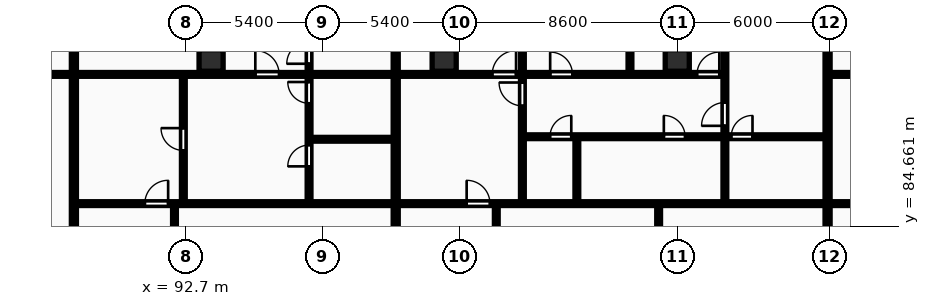
"""IFC4 building model, lengths in metres.
Left out: names, types, materials, properties, quantities, classifications, styles, units other than length and angle.
Written with IfcOpenShell. Run it as: python <this file> out.ifc"""

import sys

from ifc_helpers import new_model, si_unit, direction, frame, frame_2d, origin, origin_2d, place, context, subcontext, project, spatial, rectangle, extrude, element, fill, save


model = new_model("IFC4")
c1 = context("Model", 3, precision=1e-05, world=origin(), true_north=direction((0.0, 1.0)))
c2 = subcontext(c1, "Body", "Model", "MODEL_VIEW")
j1 = project(units=[si_unit("LENGTHUNIT", "METRE"), si_unit("PLANEANGLEUNIT", "RADIAN")], contexts=[c1])
p1 = place(None, origin())
s1 = spatial("IfcSite", under=j1, at=p1, CompositionType="ELEMENT")
p2 = place(p1, origin())
s2 = spatial("IfcBuilding", under=s1, at=p2, CompositionType="ELEMENT")
p3 = place(p2, frame((0.0, 0.0, 87.3)))
s3 = spatial("IfcBuildingStorey", under=s2, at=p3, CompositionType="ELEMENT", Elevation=87.3)
for number, where, z_axis, x_axis in (
    (1, (93.7, 91.2, 0.0), (0.0, 0.0, 1.0), (1.0, 0.0, 0.0)),
    (2, (102.9, 91.2, 0.0), (0.0, 0.0, 1.0), (1.0, 0.0, 0.0)),
    (3, (112.1, 91.2, 0.0), (0.0, 0.0, 1.0), (1.0, 0.0, 0.0)),
):
    element("IfcColumn", number, at=place(p3, frame(where, z_axis=z_axis, x_axis=x_axis)), inside=s3, PredefinedType="COLUMN", context=c2, shape_type="SweptSolid", body=[
        extrude(rectangle(XDim=0.95, YDim=0.85, at=origin_2d()), origin(), (0.0, 0.0, 1.0), 3.25),
    ])
p4 = place(p3, frame((88.285, 69.43, 0.0), z_axis=(0.0, 0.0, 1.0), x_axis=(0.0, 1.0, 0.0)))
e4 = element("IfcWall", 4, at=p4, inside=s3, PredefinedType="PARTITIONING", context=c2, shape_type="SweptSolid", body=[
    extrude(rectangle(XDim=26.47, YDim=0.2, at=frame_2d((13.235, 0.0))), origin(), (0.0, 0.0, 1.0), 2.97),
])
p5 = place(p3, frame((69.447, 90.65, 0.0), z_axis=(0.0, 0.0, 1.0), x_axis=(1.0, 0.0, 0.0)))
e5 = element("IfcWall", 5, at=p5, inside=s3, PredefinedType="PARTITIONING", context=c2, shape_type="SweptSolid", body=[
    extrude(rectangle(XDim=18.758, YDim=0.15, at=frame_2d((9.379, 0.0))), origin(), (0.0, 0.0, 1.0), 2.97),
])
p6 = place(p5, frame((3.965, 0.0, 0.0)))
e6 = element("IfcOpeningElement", 6, at=p6, cuts=e5, PredefinedType="OPENING", context=c2, shape_type="SweptSolid", body=[
    extrude(rectangle(XDim=0.94, YDim=2.1, at=frame_2d((0.47, 1.05))), frame((0.0, 0.085, 0.0), z_axis=(0.0, -1.0, 0.0), x_axis=(1.0, 0.0, 0.0)), (0.0, 0.0, 1.0), 0.17),
])
p7 = place(p5, frame((8.909, 0.0, 0.0)))
e7 = element("IfcOpeningElement", 7, at=p7, cuts=e5, PredefinedType="OPENING", context=c2, shape_type="SweptSolid", body=[
    extrude(rectangle(XDim=0.94, YDim=2.1, at=frame_2d((0.47, 1.05))), frame((0.0, 0.085, 0.0), z_axis=(0.0, -1.0, 0.0), x_axis=(1.0, 0.0, 0.0)), (0.0, 0.0, 1.0), 0.17),
])
p8 = place(p3, frame((100.987, 69.43, 0.0), z_axis=(0.0, 0.0, 1.0), x_axis=(0.0, 1.0, 0.0)))
e8 = element("IfcWall", 8, at=p8, inside=s3, PredefinedType="PARTITIONING", context=c2, shape_type="SweptSolid", body=[
    extrude(rectangle(XDim=26.47, YDim=0.2, at=frame_2d((13.235, 0.0))), origin(), (0.0, 0.0, 1.0), 2.97),
])
p9 = place(p3, frame((92.255, 69.41, 0.0), z_axis=(0.0, 0.0, 1.0), x_axis=(0.0, 1.0, 0.0)))
e9 = element("IfcWall", 9, at=p9, inside=s3, PredefinedType="PARTITIONING", context=c2, shape_type="SweptSolid", body=[
    extrude(rectangle(XDim=16.1, YDim=0.15, at=frame_2d((8.05, 0.0))), origin(), (0.0, 0.0, 1.0), 2.97),
])
p10 = place(p9, frame((6.74, 0.0, 0.0)))
e10 = element("IfcOpeningElement", 10, at=p10, cuts=e9, PredefinedType="OPENING", context=c2, shape_type="SweptSolid", body=[
    extrude(rectangle(XDim=0.88, YDim=2.06, at=frame_2d((0.44, 1.03))), frame((0.0, 0.085, 0.0), z_axis=(0.0, -1.0, 0.0), x_axis=(1.0, 0.0, 0.0)), (0.0, 0.0, 1.0), 0.17),
])
p11 = place(p3, frame((92.604, 85.59, 0.0), z_axis=(0.0, 0.0, 1.0), x_axis=(0.0, 1.0, 0.0)))
e11 = element("IfcWall", 11, at=p11, inside=s3, PredefinedType="PARTITIONING", context=c2, shape_type="SweptSolid", body=[
    extrude(rectangle(XDim=5.0, YDim=0.15, at=frame_2d((2.5, 0.0))), origin(), (0.0, 0.0, 1.0), 2.97),
])
p12 = place(p11, frame((2.06, 0.0, 0.0)))
e12 = element("IfcOpeningElement", 12, at=p12, cuts=e11, PredefinedType="OPENING", context=c2, shape_type="SweptSolid", body=[
    extrude(rectangle(XDim=0.88, YDim=2.06, at=frame_2d((0.44, 1.03))), frame((0.0, 0.085, 0.0), z_axis=(0.0, -1.0, 0.0), x_axis=(1.0, 0.0, 0.0)), (0.0, 0.0, 1.0), 0.17),
])
p13 = place(p3, frame((97.627, 88.09, 0.0), z_axis=(0.0, 0.0, 1.0), x_axis=(1.0, 0.0, 0.0)))
e13 = element("IfcWall", 13, at=p13, inside=s3, PredefinedType="PARTITIONING", context=c2, shape_type="SweptSolid", body=[
    extrude(rectangle(XDim=3.28, YDim=0.15, at=frame_2d((1.64, 0.0))), origin(), (0.0, 0.0, 1.0), 2.97),
])
p14 = place(p3, frame((97.567, 85.59, 0.0), z_axis=(0.0, 0.0, 1.0), x_axis=(0.0, 1.0, 0.0)))
e14 = element("IfcWall", 14, at=p14, inside=s3, PredefinedType="PARTITIONING", context=c2, shape_type="SweptSolid", body=[
    extrude(rectangle(XDim=10.31, YDim=0.15, at=frame_2d((5.155, 0.0))), origin(), (0.0, 0.0, 1.0), 2.97),
])
p15 = place(p14, frame((1.43, 0.0, 0.0)))
e15 = element("IfcOpeningElement", 15, at=p15, cuts=e14, PredefinedType="OPENING", context=c2, shape_type="SweptSolid", body=[
    extrude(rectangle(XDim=0.84, YDim=2.04, at=frame_2d((0.42, 1.02))), frame((0.0, 0.085, 0.0), z_axis=(0.0, -1.0, 0.0), x_axis=(1.0, 0.0, 0.0)), (0.0, 0.0, 1.0), 0.17),
])
p16 = place(p14, frame((3.92, 0.0, 0.0)))
e16 = element("IfcOpeningElement", 16, at=p16, cuts=e14, PredefinedType="OPENING", context=c2, shape_type="SweptSolid", body=[
    extrude(rectangle(XDim=0.84, YDim=2.04, at=frame_2d((0.42, 1.02))), frame((0.0, 0.085, 0.0), z_axis=(0.0, -1.0, 0.0), x_axis=(1.0, 0.0, 0.0)), (0.0, 0.0, 1.0), 0.17),
])
p17 = place(p14, frame((5.48, 0.0, 0.0)))
e17 = element("IfcOpeningElement", 17, at=p17, cuts=e14, PredefinedType="OPENING", context=c2, shape_type="SweptSolid", body=[
    extrude(rectangle(XDim=0.88, YDim=2.06, at=frame_2d((0.44, 1.03))), frame((0.0, 0.085, 0.0), z_axis=(0.0, -1.0, 0.0), x_axis=(1.0, 0.0, 0.0)), (0.0, 0.0, 1.0), 0.17),
])
p18 = place(p3, frame((88.365, 85.55, 0.0), z_axis=(0.0, 0.0, 1.0), x_axis=(1.0, 0.0, 0.0)))
e18 = element("IfcWall", 18, at=p18, inside=s3, PredefinedType="PARTITIONING", context=c2, shape_type="SweptSolid", body=[
    extrude(rectangle(XDim=12.543, YDim=0.15, at=frame_2d((6.271, 0.0))), origin(), (0.0, 0.0, 1.0), 2.97),
])
p19 = place(p18, frame((2.72, 0.0, 0.0)))
e19 = element("IfcOpeningElement", 19, at=p19, cuts=e18, PredefinedType="OPENING", context=c2, shape_type="SweptSolid", body=[
    extrude(rectangle(XDim=0.92, YDim=2.08, at=frame_2d((0.46, 1.04))), frame((0.0, 0.085, 0.0), z_axis=(0.0, -1.0, 0.0), x_axis=(1.0, 0.0, 0.0)), (0.0, 0.0, 1.0), 0.17),
])
p20 = place(p3, frame((88.365, 90.65, 0.0), z_axis=(0.0, 0.0, 1.0), x_axis=(1.0, 0.0, 0.0)))
e20 = element("IfcWall", 20, at=p20, inside=s3, PredefinedType="PARTITIONING", context=c2, shape_type="SweptSolid", body=[
    extrude(rectangle(XDim=12.543, YDim=0.15, at=frame_2d((6.271, 0.0))), origin(), (0.0, 0.0, 1.0), 2.97),
])
p21 = place(p20, frame((7.081, 0.0, 0.0)))
e21 = element("IfcOpeningElement", 21, at=p21, cuts=e20, PredefinedType="OPENING", context=c2, shape_type="SweptSolid", body=[
    extrude(rectangle(XDim=0.94, YDim=2.1, at=frame_2d((0.47, 1.05))), frame((0.0, 0.085, 0.0), z_axis=(0.0, -1.0, 0.0), x_axis=(1.0, 0.0, 0.0)), (0.0, 0.0, 1.0), 0.17),
])
p22 = place(p3, frame((118.033, 69.43, 0.0), z_axis=(0.0, 0.0, 1.0), x_axis=(0.0, 1.0, 0.0)))
e22 = element("IfcWall", 22, at=p22, inside=s3, PredefinedType="PARTITIONING", context=c2, shape_type="SweptSolid", body=[
    extrude(rectangle(XDim=26.47, YDim=0.2, at=frame_2d((13.235, 0.0))), origin(), (0.0, 0.0, 1.0), 2.97),
])
p23 = place(p3, frame((111.365, 69.41, 0.0), z_axis=(0.0, 0.0, 1.0), x_axis=(0.0, 1.0, 0.0)))
e23 = element("IfcWall", 23, at=p23, inside=s3, PredefinedType="PARTITIONING", context=c2, shape_type="SweptSolid", body=[
    extrude(rectangle(XDim=16.1, YDim=0.15, at=frame_2d((8.05, 0.0))), origin(), (0.0, 0.0, 1.0), 2.97),
])
p24 = place(p23, frame((6.96, 0.0, 0.0)))
e24 = element("IfcOpeningElement", 24, at=p24, cuts=e23, PredefinedType="OPENING", context=c2, shape_type="SweptSolid", body=[
    extrude(rectangle(XDim=0.84, YDim=2.04, at=frame_2d((0.42, 1.02))), frame((0.0, 0.085, 0.0), z_axis=(0.0, -1.0, 0.0), x_axis=(1.0, 0.0, 0.0)), (0.0, 0.0, 1.0), 0.17),
])
p25 = place(p23, frame((11.848, 0.0, 0.0)))
e25 = element("IfcOpeningElement", 25, at=p25, cuts=e23, PredefinedType="OPENING", context=c2, shape_type="SweptSolid", body=[
    extrude(rectangle(XDim=0.88, YDim=2.06, at=frame_2d((0.44, 1.03))), frame((0.0, 0.085, 0.0), z_axis=(0.0, -1.0, 0.0), x_axis=(1.0, 0.0, 0.0)), (0.0, 0.0, 1.0), 0.17),
])
p26 = place(p3, frame((104.957, 69.41, 0.0), z_axis=(0.0, 0.0, 1.0), x_axis=(0.0, 1.0, 0.0)))
e26 = element("IfcWall", 26, at=p26, inside=s3, PredefinedType="PARTITIONING", context=c2, shape_type="SweptSolid", body=[
    extrude(rectangle(XDim=16.1, YDim=0.15, at=frame_2d((8.05, 0.0))), origin(), (0.0, 0.0, 1.0), 2.97),
])
p27 = place(p26, frame((6.92, 0.0, 0.0)))
e27 = element("IfcOpeningElement", 27, at=p27, cuts=e26, PredefinedType="OPENING", context=c2, shape_type="SweptSolid", body=[
    extrude(rectangle(XDim=0.88, YDim=2.06, at=frame_2d((0.44, 1.03))), frame((0.0, 0.085, 0.0), z_axis=(0.0, -1.0, 0.0), x_axis=(1.0, 0.0, 0.0)), (0.0, 0.0, 1.0), 0.17),
])
p28 = place(p3, frame((108.137, 85.59, 0.0), z_axis=(0.0, 0.0, 1.0), x_axis=(0.0, 1.0, 0.0)))
e28 = element("IfcWall", 28, at=p28, inside=s3, PredefinedType="PARTITIONING", context=c2, shape_type="SweptSolid", body=[
    extrude(rectangle(XDim=2.58, YDim=0.15, at=frame_2d((1.29, 0.0))), origin(), (0.0, 0.0, 1.0), 2.97),
])
p29 = place(p3, frame((110.234, 90.73, 0.0), z_axis=(0.0, 0.0, 1.0), x_axis=(0.0, 1.0, 0.0)))
e29 = element("IfcWall", 29, at=p29, inside=s3, PredefinedType="PARTITIONING", context=c2, shape_type="SweptSolid", body=[
    extrude(rectangle(XDim=5.17, YDim=0.15, at=frame_2d((2.585, 0.0))), origin(), (0.0, 0.0, 1.0), 2.97),
])
p30 = place(p3, frame((105.987, 85.59, 0.0), z_axis=(0.0, 0.0, 1.0), x_axis=(0.0, 1.0, 0.0)))
e30 = element("IfcWall", 30, at=p30, inside=s3, PredefinedType="PARTITIONING", context=c2, shape_type="SweptSolid", body=[
    extrude(rectangle(XDim=10.31, YDim=0.15, at=frame_2d((5.155, 0.0))), origin(), (0.0, 0.0, 1.0), 2.97),
])
p31 = place(p30, frame((3.82, 0.0, 0.0)))
e31 = element("IfcOpeningElement", 31, at=p31, cuts=e30, PredefinedType="OPENING", context=c2, shape_type="SweptSolid", body=[
    extrude(rectangle(XDim=0.92, YDim=2.08, at=frame_2d((0.46, 1.04))), frame((0.0, 0.085, 0.0), z_axis=(0.0, -1.0, 0.0), x_axis=(1.0, 0.0, 0.0)), (0.0, 0.0, 1.0), 0.17),
])
p32 = place(p3, frame((113.98, 85.59, 0.0), z_axis=(0.0, 0.0, 1.0), x_axis=(0.0, 1.0, 0.0)))
e32 = element("IfcWall", 32, at=p32, inside=s3, PredefinedType="PARTITIONING", context=c2, shape_type="SweptSolid", body=[
    extrude(rectangle(XDim=2.58, YDim=0.15, at=frame_2d((1.29, 0.0))), origin(), (0.0, 0.0, 1.0), 2.97),
])
p33 = place(p3, frame((113.98, 88.21, 0.0), z_axis=(0.0, 0.0, 1.0), x_axis=(0.0, 1.0, 0.0)))
e33 = element("IfcWall", 33, at=p33, inside=s3, PredefinedType="PARTITIONING", context=c2, shape_type="SweptSolid", body=[
    extrude(rectangle(XDim=7.69, YDim=0.15, at=frame_2d((3.845, 0.0))), origin(), (0.0, 0.0, 1.0), 2.97),
])
p34 = place(p33, frame((0.41, 0.0, 0.0)))
e34 = element("IfcOpeningElement", 34, at=p34, cuts=e33, PredefinedType="OPENING", context=c2, shape_type="SweptSolid", body=[
    extrude(rectangle(XDim=0.92, YDim=2.08, at=frame_2d((0.46, 1.04))), frame((0.0, 0.085, 0.0), z_axis=(0.0, -1.0, 0.0), x_axis=(1.0, 0.0, 0.0)), (0.0, 0.0, 1.0), 0.17),
])
p35 = place(p3, frame((106.027, 88.19, 0.0), z_axis=(0.0, 0.0, 1.0), x_axis=(1.0, 0.0, 0.0)))
e35 = element("IfcWall", 35, at=p35, inside=s3, PredefinedType="PARTITIONING", context=c2, shape_type="SweptSolid", body=[
    extrude(rectangle(XDim=11.926, YDim=0.15, at=frame_2d((5.963, 0.0))), origin(), (0.0, 0.0, 1.0), 2.97),
])
p36 = place(p35, frame((1.05, 0.0, 0.0)))
e36 = element("IfcOpeningElement", 36, at=p36, cuts=e35, PredefinedType="OPENING", context=c2, shape_type="SweptSolid", body=[
    extrude(rectangle(XDim=0.84, YDim=2.04, at=frame_2d((0.42, 1.02))), frame((0.0, 0.085, 0.0), z_axis=(0.0, -1.0, 0.0), x_axis=(1.0, 0.0, 0.0)), (0.0, 0.0, 1.0), 0.17),
])
p37 = place(p35, frame((5.543, 0.0, 0.0)))
e37 = element("IfcOpeningElement", 37, at=p37, cuts=e35, PredefinedType="OPENING", context=c2, shape_type="SweptSolid", body=[
    extrude(rectangle(XDim=0.84, YDim=2.04, at=frame_2d((0.42, 1.02))), frame((0.0, 0.085, 0.0), z_axis=(0.0, -1.0, 0.0), x_axis=(1.0, 0.0, 0.0)), (0.0, 0.0, 1.0), 0.17),
])
p38 = place(p35, frame((8.203, 0.0, 0.0)))
e38 = element("IfcOpeningElement", 38, at=p38, cuts=e35, PredefinedType="OPENING", context=c2, shape_type="SweptSolid", body=[
    extrude(rectangle(XDim=0.84, YDim=2.04, at=frame_2d((0.42, 1.02))), frame((0.0, 0.085, 0.0), z_axis=(0.0, -1.0, 0.0), x_axis=(1.0, 0.0, 0.0)), (0.0, 0.0, 1.0), 0.17),
])
p39 = place(p3, frame((101.067, 85.55, 0.0), z_axis=(0.0, 0.0, 1.0), x_axis=(1.0, 0.0, 0.0)))
e39 = element("IfcWall", 39, at=p39, inside=s3, PredefinedType="PARTITIONING", context=c2, shape_type="SweptSolid", body=[
    extrude(rectangle(XDim=16.886, YDim=0.15, at=frame_2d((8.443, 0.0))), origin(), (0.0, 0.0, 1.0), 2.97),
])
p40 = place(p39, frame((2.72, 0.0, 0.0)))
e40 = element("IfcOpeningElement", 40, at=p40, cuts=e39, PredefinedType="OPENING", context=c2, shape_type="SweptSolid", body=[
    extrude(rectangle(XDim=0.92, YDim=2.08, at=frame_2d((0.46, 1.04))), frame((0.0, 0.085, 0.0), z_axis=(0.0, -1.0, 0.0), x_axis=(1.0, 0.0, 0.0)), (0.0, 0.0, 1.0), 0.17),
])
p41 = place(p3, frame((101.067, 90.65, 0.0), z_axis=(0.0, 0.0, 1.0), x_axis=(1.0, 0.0, 0.0)))
e41 = element("IfcWall", 41, at=p41, inside=s3, PredefinedType="PARTITIONING", context=c2, shape_type="SweptSolid", body=[
    extrude(rectangle(XDim=12.913, YDim=0.15, at=frame_2d((6.457, 0.0))), origin(), (0.0, 0.0, 1.0), 2.97),
])
p42 = place(p41, frame((3.73, 0.0, 0.0)))
e42 = element("IfcOpeningElement", 42, at=p42, cuts=e41, PredefinedType="OPENING", context=c2, shape_type="SweptSolid", body=[
    extrude(rectangle(XDim=0.94, YDim=2.1, at=frame_2d((0.47, 1.05))), frame((0.0, 0.085, 0.0), z_axis=(0.0, -1.0, 0.0), x_axis=(1.0, 0.0, 0.0)), (0.0, 0.0, 1.0), 0.17),
])
p43 = place(p41, frame((6.016, 0.0, 0.0)))
e43 = element("IfcOpeningElement", 43, at=p43, cuts=e41, PredefinedType="OPENING", context=c2, shape_type="SweptSolid", body=[
    extrude(rectangle(XDim=0.88, YDim=2.06, at=frame_2d((0.44, 1.03))), frame((0.0, 0.085, 0.0), z_axis=(0.0, -1.0, 0.0), x_axis=(1.0, 0.0, 0.0)), (0.0, 0.0, 1.0), 0.17),
])
p44 = place(p41, frame((11.813, 0.0, 0.0)))
e44 = element("IfcOpeningElement", 44, at=p44, cuts=e41, PredefinedType="OPENING", context=c2, shape_type="SweptSolid", body=[
    extrude(rectangle(XDim=0.88, YDim=2.06, at=frame_2d((0.44, 1.03))), frame((0.0, 0.085, 0.0), z_axis=(0.0, -1.0, 0.0), x_axis=(1.0, 0.0, 0.0)), (0.0, 0.0, 1.0), 0.17),
])
p45 = place(p3, frame((118.113, 85.55, 0.0), z_axis=(0.0, 0.0, 1.0), x_axis=(1.0, 0.0, 0.0)))
e45 = element("IfcWall", 45, at=p45, inside=s3, PredefinedType="PARTITIONING", context=c2, shape_type="SweptSolid", body=[
    extrude(rectangle(XDim=12.407, YDim=0.15, at=frame_2d((6.203, 0.0))), origin(), (0.0, 0.0, 1.0), 2.97),
])
p46 = place(p45, frame((2.72, 0.0, 0.0)))
e46 = element("IfcOpeningElement", 46, at=p46, cuts=e45, PredefinedType="OPENING", context=c2, shape_type="SweptSolid", body=[
    extrude(rectangle(XDim=0.92, YDim=2.08, at=frame_2d((0.46, 1.04))), frame((0.0, 0.085, 0.0), z_axis=(0.0, -1.0, 0.0), x_axis=(1.0, 0.0, 0.0)), (0.0, 0.0, 1.0), 0.17),
])
p47 = place(p3, frame((118.113, 90.65, 0.0), z_axis=(0.0, 0.0, 1.0), x_axis=(1.0, 0.0, 0.0)))
e47 = element("IfcWall", 47, at=p47, inside=s3, PredefinedType="PARTITIONING", context=c2, shape_type="SweptSolid", body=[
    extrude(rectangle(XDim=12.407, YDim=0.15, at=frame_2d((6.203, 0.0))), origin(), (0.0, 0.0, 1.0), 2.97),
])
p48 = place(p47, frame((5.733, 0.0, 0.0)))
e48 = element("IfcOpeningElement", 48, at=p48, cuts=e47, PredefinedType="OPENING", context=c2, shape_type="SweptSolid", body=[
    extrude(rectangle(XDim=0.94, YDim=2.1, at=frame_2d((0.47, 1.05))), frame((0.0, 0.085, 0.0), z_axis=(0.0, -1.0, 0.0), x_axis=(1.0, 0.0, 0.0)), (0.0, 0.0, 1.0), 0.17),
])
p49 = place(p12, origin())
e49 = element("IfcDoor", 49, at=p49, inside=s3, OperationType="SINGLE_SWING_RIGHT", PredefinedType="DOOR", context=c2, shape_type="SweptSolid", body=[
    extrude(rectangle(XDim=0.88, YDim=2.06, at=frame_2d((0.44, 1.03))), frame((0.0, 0.025, 0.0), z_axis=(0.0, -1.0, 0.0), x_axis=(1.0, 0.0, 0.0)), (0.0, 0.0, 1.0), 0.05),
])
fill(e12, e49)
p50 = place(p15, origin())
e50 = element("IfcDoor", 50, at=p50, inside=s3, OperationType="SINGLE_SWING_LEFT", PredefinedType="DOOR", context=c2, shape_type="SweptSolid", body=[
    extrude(rectangle(XDim=0.84, YDim=2.04, at=frame_2d((0.42, 1.02))), frame((0.0, 0.025, 0.0), z_axis=(0.0, -1.0, 0.0), x_axis=(1.0, 0.0, 0.0)), (0.0, 0.0, 1.0), 0.05),
])
fill(e15, e50)
p51 = place(p16, origin())
e51 = element("IfcDoor", 51, at=p51, inside=s3, OperationType="SINGLE_SWING_RIGHT", PredefinedType="DOOR", context=c2, shape_type="SweptSolid", body=[
    extrude(rectangle(XDim=0.84, YDim=2.04, at=frame_2d((0.42, 1.02))), frame((0.0, 0.025, 0.0), z_axis=(0.0, -1.0, 0.0), x_axis=(1.0, 0.0, 0.0)), (0.0, 0.0, 1.0), 0.05),
])
fill(e16, e51)
p52 = place(p17, origin())
e52 = element("IfcDoor", 52, at=p52, inside=s3, OperationType="SINGLE_SWING_LEFT", PredefinedType="DOOR", context=c2, shape_type="SweptSolid", body=[
    extrude(rectangle(XDim=0.88, YDim=2.06, at=frame_2d((0.44, 1.03))), frame((0.0, 0.025, 0.0), z_axis=(0.0, -1.0, 0.0), x_axis=(1.0, 0.0, 0.0)), (0.0, 0.0, 1.0), 0.05),
])
fill(e17, e52)
p53 = place(p19, origin())
e53 = element("IfcDoor", 53, at=p53, inside=s3, OperationType="SINGLE_SWING_RIGHT", PredefinedType="DOOR", context=c2, shape_type="SweptSolid", body=[
    extrude(rectangle(XDim=0.92, YDim=2.08, at=frame_2d((0.46, 1.04))), frame((0.0, 0.025, 0.0), z_axis=(0.0, -1.0, 0.0), x_axis=(1.0, 0.0, 0.0)), (0.0, 0.0, 1.0), 0.05),
])
fill(e19, e53)
p54 = place(p21, origin())
e54 = element("IfcDoor", 54, at=p54, inside=s3, OperationType="SINGLE_SWING_LEFT", PredefinedType="DOOR", context=c2, shape_type="SweptSolid", body=[
    extrude(rectangle(XDim=0.94, YDim=2.1, at=frame_2d((0.47, 1.05))), frame((0.0, 0.025, 0.0), z_axis=(0.0, -1.0, 0.0), x_axis=(1.0, 0.0, 0.0)), (0.0, 0.0, 1.0), 0.05),
])
fill(e21, e54)
p55 = place(p31, origin())
e55 = element("IfcDoor", 55, at=p55, inside=s3, OperationType="SINGLE_SWING_RIGHT", PredefinedType="DOOR", context=c2, shape_type="SweptSolid", body=[
    extrude(rectangle(XDim=0.92, YDim=2.08, at=frame_2d((0.46, 1.04))), frame((0.0, 0.025, 0.0), z_axis=(0.0, -1.0, 0.0), x_axis=(1.0, 0.0, 0.0)), (0.0, 0.0, 1.0), 0.05),
])
fill(e31, e55)
p56 = place(p34, origin())
e56 = element("IfcDoor", 56, at=p56, inside=s3, OperationType="SINGLE_SWING_LEFT", PredefinedType="DOOR", context=c2, shape_type="SweptSolid", body=[
    extrude(rectangle(XDim=0.92, YDim=2.08, at=frame_2d((0.46, 1.04))), frame((0.0, 0.025, 0.0), z_axis=(0.0, -1.0, 0.0), x_axis=(1.0, 0.0, 0.0)), (0.0, 0.0, 1.0), 0.05),
])
fill(e34, e56)
p57 = place(p36, origin())
e57 = element("IfcDoor", 57, at=p57, inside=s3, OperationType="SINGLE_SWING_RIGHT", PredefinedType="DOOR", context=c2, shape_type="SweptSolid", body=[
    extrude(rectangle(XDim=0.84, YDim=2.04, at=frame_2d((0.42, 1.02))), frame((0.0, 0.025, 0.0), z_axis=(0.0, -1.0, 0.0), x_axis=(1.0, 0.0, 0.0)), (0.0, 0.0, 1.0), 0.05),
])
fill(e36, e57)
p58 = place(p37, origin())
e58 = element("IfcDoor", 58, at=p58, inside=s3, OperationType="SINGLE_SWING_LEFT", PredefinedType="DOOR", context=c2, shape_type="SweptSolid", body=[
    extrude(rectangle(XDim=0.84, YDim=2.04, at=frame_2d((0.42, 1.02))), frame((0.0, 0.025, 0.0), z_axis=(0.0, -1.0, 0.0), x_axis=(1.0, 0.0, 0.0)), (0.0, 0.0, 1.0), 0.05),
])
fill(e37, e58)
p59 = place(p38, origin())
e59 = element("IfcDoor", 59, at=p59, inside=s3, OperationType="SINGLE_SWING_RIGHT", PredefinedType="DOOR", context=c2, shape_type="SweptSolid", body=[
    extrude(rectangle(XDim=0.84, YDim=2.04, at=frame_2d((0.42, 1.02))), frame((0.0, 0.025, 0.0), z_axis=(0.0, -1.0, 0.0), x_axis=(1.0, 0.0, 0.0)), (0.0, 0.0, 1.0), 0.05),
])
fill(e38, e59)
p60 = place(p40, origin())
e60 = element("IfcDoor", 60, at=p60, inside=s3, OperationType="SINGLE_SWING_LEFT", PredefinedType="DOOR", context=c2, shape_type="SweptSolid", body=[
    extrude(rectangle(XDim=0.92, YDim=2.08, at=frame_2d((0.46, 1.04))), frame((0.0, 0.025, 0.0), z_axis=(0.0, -1.0, 0.0), x_axis=(1.0, 0.0, 0.0)), (0.0, 0.0, 1.0), 0.05),
])
fill(e40, e60)
p61 = place(p42, origin())
e61 = element("IfcDoor", 61, at=p61, inside=s3, OperationType="SINGLE_SWING_RIGHT", PredefinedType="DOOR", context=c2, shape_type="SweptSolid", body=[
    extrude(rectangle(XDim=0.94, YDim=2.1, at=frame_2d((0.47, 1.05))), frame((0.0, 0.025, 0.0), z_axis=(0.0, -1.0, 0.0), x_axis=(1.0, 0.0, 0.0)), (0.0, 0.0, 1.0), 0.05),
])
fill(e42, e61)
p62 = place(p43, origin())
e62 = element("IfcDoor", 62, at=p62, inside=s3, OperationType="SINGLE_SWING_LEFT", PredefinedType="DOOR", context=c2, shape_type="SweptSolid", body=[
    extrude(rectangle(XDim=0.88, YDim=2.06, at=frame_2d((0.44, 1.03))), frame((0.0, 0.025, 0.0), z_axis=(0.0, -1.0, 0.0), x_axis=(1.0, 0.0, 0.0)), (0.0, 0.0, 1.0), 0.05),
])
fill(e43, e62)
p63 = place(p44, origin())
e63 = element("IfcDoor", 63, at=p63, inside=s3, OperationType="SINGLE_SWING_RIGHT", PredefinedType="DOOR", context=c2, shape_type="SweptSolid", body=[
    extrude(rectangle(XDim=0.88, YDim=2.06, at=frame_2d((0.44, 1.03))), frame((0.0, 0.025, 0.0), z_axis=(0.0, -1.0, 0.0), x_axis=(1.0, 0.0, 0.0)), (0.0, 0.0, 1.0), 0.05),
])
fill(e44, e63)
save(model, sys.argv[1])
